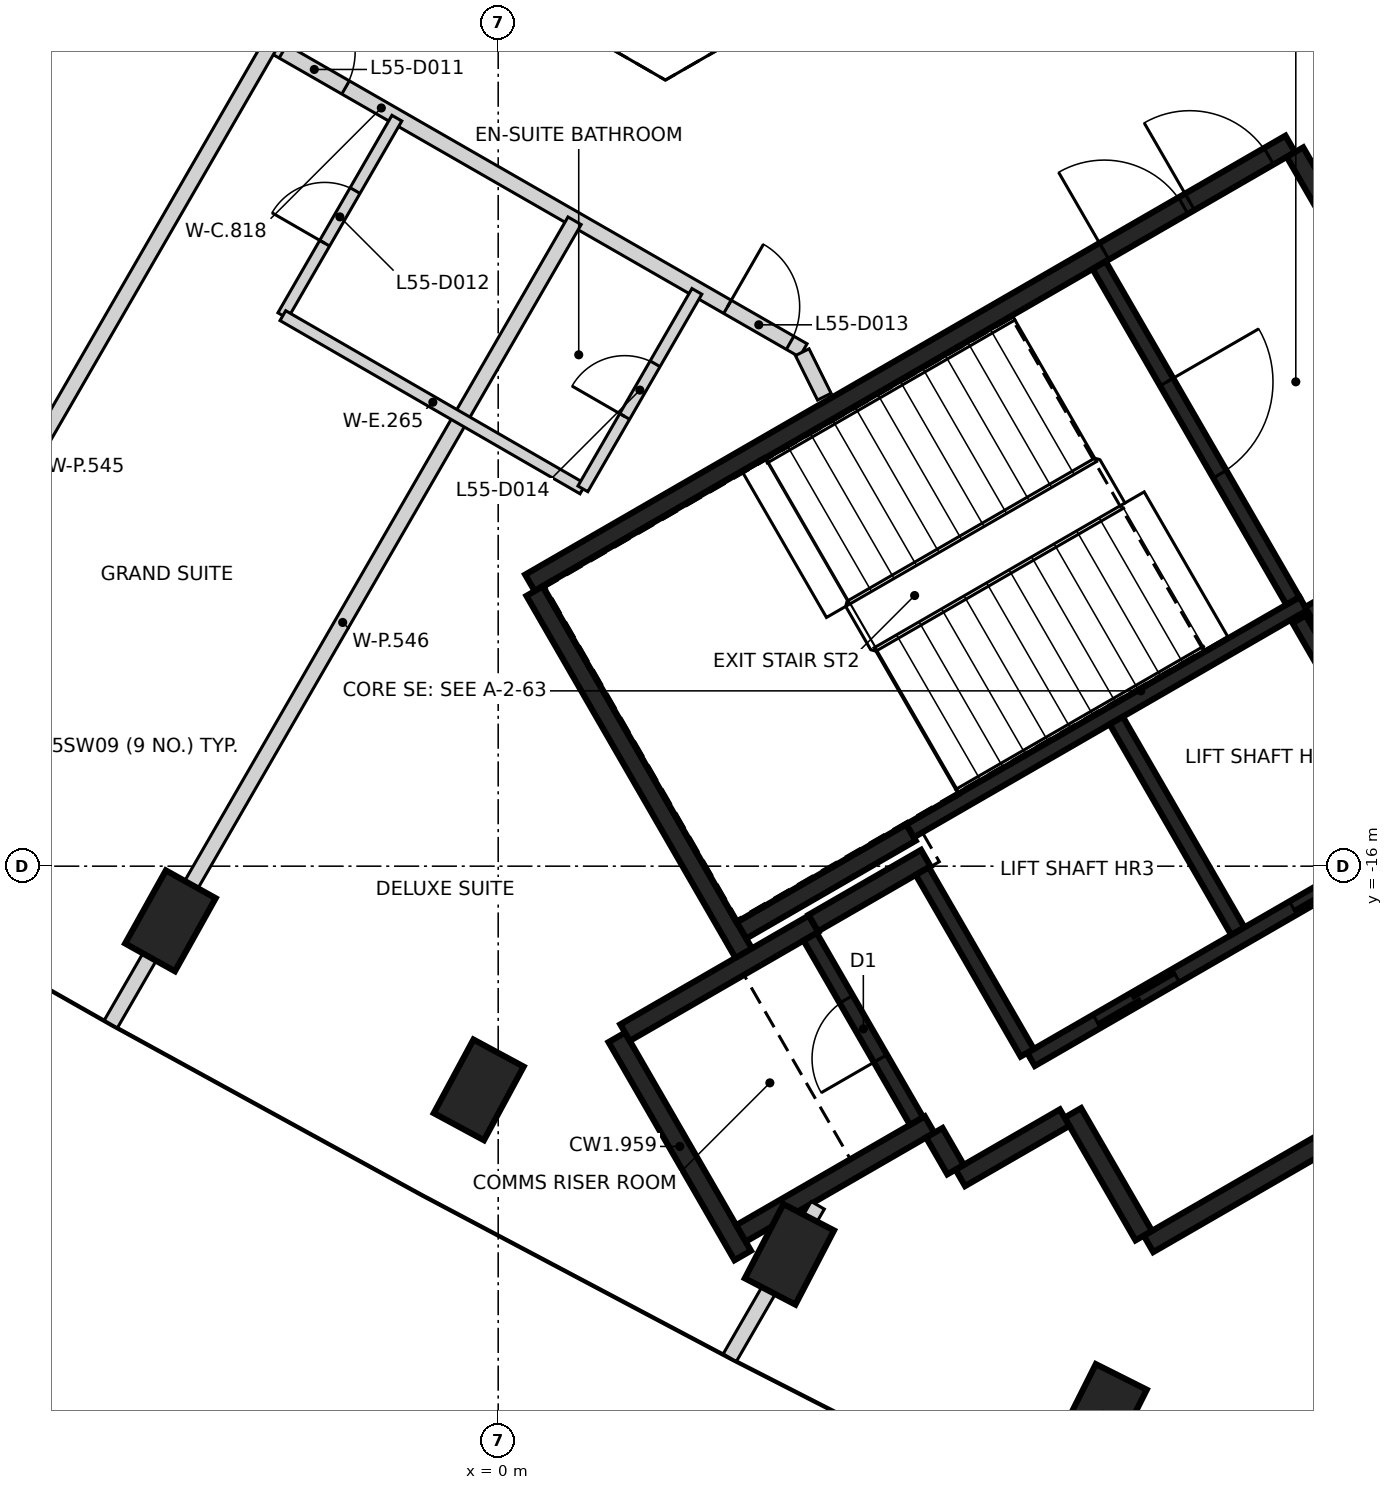
"""IFC4 building model, lengths in metres.
Left out: names, types, materials, properties, quantities, classifications, styles, units other than length and angle.
Written with IfcOpenShell. Run it as: python <this file> out.ifc"""

import sys

from ifc_helpers import new_model, si_unit, direction, frame, frame_2d, origin, origin_2d, place, context, subcontext, project, spatial, rectangle, extrude, element, fill, save


model = new_model("IFC4")
c1 = context("Model", 3, precision=1e-05, world=origin(), true_north=direction((0.0, 1.0)))
c2 = subcontext(c1, "Body", "Model", "MODEL_VIEW")
j1 = project(units=[si_unit("LENGTHUNIT", "METRE"), si_unit("PLANEANGLEUNIT", "RADIAN")], contexts=[c1])
p1 = place(None, origin())
s1 = spatial("IfcSite", under=j1, at=p1, CompositionType="ELEMENT")
p2 = place(p1, origin())
s2 = spatial("IfcBuilding", under=s1, at=p2, CompositionType="ELEMENT")
p3 = place(p2, frame((0.0, 0.0, 221.4)))
s3 = spatial("IfcBuildingStorey", under=s2, at=p3, CompositionType="ELEMENT", Elevation=221.4)
for number, where, z_axis, x_axis in (
    (1, (-4.312, -16.719, -0.35), (0.0, 0.0, 1.0), (0.487, 0.873, 0.0)),
    (2, (-0.256, -18.943, -0.35), (0.0, 0.0, 1.0), (0.475, 0.88, 0.0)),
    (3, (3.832, -21.107, -0.35), (0.0, 0.0, 1.0), (0.461, 0.887, 0.0)),
    (4, (7.951, -23.211, -0.35), (0.0, 0.0, 1.0), (0.449, 0.894, 0.0)),
):
    element("IfcColumn", number, at=place(p3, frame(where, z_axis=z_axis, x_axis=x_axis)), inside=s3, PredefinedType="COLUMN", context=c2, shape_type="SweptSolid", body=[
        extrude(rectangle(XDim=1.1, YDim=0.75, at=origin_2d()), origin(), (0.0, 0.0, 1.0), 3.6),
    ])
p4 = place(p3, frame((0.417, -12.273, 0.0), z_axis=(0.0, 0.0, 1.0), x_axis=(0.866021906294, 0.500006057782, 0.0)))
e5 = element("IfcWall", 5, at=p4, inside=s3, PredefinedType="SHEAR", context=c2, shape_type="SweptSolid", body=[
    extrude(rectangle(XDim=11.55, YDim=0.25, at=frame_2d((5.775, 0.0))), origin(), (0.0, 0.0, 1.0), 3.25),
])
p5 = place(p4, frame((10.025, 0.0, 0.0)))
e6 = element("IfcOpeningElement", 6, at=p5, cuts=e5, PredefinedType="OPENING", context=c2, shape_type="SweptSolid", body=[
    extrude(rectangle(XDim=1.2, YDim=2.1, at=frame_2d((0.6, 1.05))), frame((0.0, 0.135, 0.0), z_axis=(0.0, -1.0, 0.0), x_axis=(1.0, 0.0, 0.0)), (0.0, 0.0, 1.0), 0.27),
])
p6 = place(p4, frame((8.725, 0.0, 0.0)))
e7 = element("IfcOpeningElement", 7, at=p6, cuts=e5, PredefinedType="OPENING", context=c2, shape_type="SweptSolid", body=[
    extrude(rectangle(XDim=1.2, YDim=2.1, at=frame_2d((0.6, 1.05))), frame((0.0, 0.135, 0.0), z_axis=(0.0, -1.0, 0.0), x_axis=(1.0, 0.0, 0.0)), (0.0, 0.0, 1.0), 0.27),
])
p7 = place(p3, frame((16.133, -16.594, 0.0), z_axis=(0.0, 0.0, 1.0), x_axis=(-0.866022959057, -0.500004234368, 0.0)))
e8 = element("IfcWall", 8, at=p7, inside=s3, PredefinedType="SHEAR", context=c2, shape_type="SweptSolid", body=[
    extrude(rectangle(XDim=8.75, YDim=0.25, at=frame_2d((4.375, 0.0))), origin(), (0.0, 0.0, 1.0), 3.25),
])
p8 = place(p3, frame((3.235, -17.153, 0.0), z_axis=(0.0, 0.0, 1.0), x_axis=(-0.500008851346, 0.866020293397, 0.0)))
e9 = element("IfcWall", 9, at=p8, inside=s3, PredefinedType="SHEAR", context=c2, shape_type="SweptSolid", body=[
    extrude(rectangle(XDim=5.51, YDim=0.25, at=frame_2d((2.755, 0.0))), origin(), (0.0, 0.0, 1.0), 3.25),
])
p9 = place(p3, frame((10.483, -6.606, 0.0), z_axis=(0.0, 0.0, 1.0), x_axis=(0.49999885962, -0.866026062182, 0.0)))
e10 = element("IfcWall", 10, at=p9, inside=s3, PredefinedType="SHEAR", context=c2, shape_type="SweptSolid", body=[
    extrude(rectangle(XDim=5.225, YDim=0.25, at=frame_2d((2.612, 0.0))), origin(), (0.0, 0.0, 1.0), 3.25),
])
p10 = place(p3, frame((3.217, -21.122, 0.0), z_axis=(0.0, 0.0, 1.0), x_axis=(-0.499998874531, 0.866026053573, 0.0)))
e11 = element("IfcWall", 11, at=p10, inside=s3, PredefinedType="SHEAR", context=c2, shape_type="SweptSolid", body=[
    extrude(rectangle(XDim=3.313, YDim=0.25, at=frame_2d((1.656, 0.0))), origin(), (0.0, 0.0, 1.0), 3.25),
])
p11 = place(p3, frame((1.669, -18.19, 0.0), z_axis=(0.0, 0.0, 1.0), x_axis=(0.866042235819, 0.499970844928, 0.0)))
e12 = element("IfcWall", 12, at=p11, inside=s3, PredefinedType="SHEAR", context=c2, shape_type="SweptSolid", body=[
    extrude(rectangle(XDim=2.865, YDim=0.25, at=frame_2d((1.432, 0.0))), origin(), (0.0, 0.0, 1.0), 3.25),
])
p12 = place(p3, frame((5.675, -19.399, 0.0), z_axis=(0.0, 0.0, 1.0), x_axis=(-0.866026637627, -0.499997862916, 0.0)))
e13 = element("IfcWall", 13, at=p12, inside=s3, PredefinedType="SHEAR", context=c2, shape_type="SweptSolid", body=[
    extrude(rectangle(XDim=2.865, YDim=0.25, at=frame_2d((1.432, 0.0))), origin(), (0.0, 0.0, 1.0), 3.25),
])
p13 = place(p3, frame((5.431, -15.556, 0.0), z_axis=(0.0, 0.0, 1.0), x_axis=(-0.866022940537, -0.500004266446, 0.0)))
e14 = element("IfcWall", 14, at=p13, inside=s3, PredefinedType="SHEAR", context=c2, shape_type="SweptSolid", body=[
    extrude(rectangle(XDim=2.575, YDim=0.25, at=frame_2d((1.287, 0.0))), origin(), (0.0, 0.0, 1.0), 3.25),
])
p14 = place(p3, frame((8.493, -20.86, 0.0), z_axis=(0.0, 0.0, 1.0), x_axis=(-0.500039802285, 0.866002422705, 0.0)))
e15 = element("IfcWall", 15, at=p14, inside=s3, PredefinedType="SHEAR", context=c2, shape_type="SweptSolid", body=[
    extrude(rectangle(XDim=1.865, YDim=0.25, at=frame_2d((0.932, 0.0))), origin(), (0.0, 0.0, 1.0), 3.25),
])
p15 = place(p3, frame((4.145, -16.749, 0.0), z_axis=(0.0, 0.0, 1.0), x_axis=(0.866038183914, 0.499977863513, 0.0)))
e16 = element("IfcWall", 16, at=p15, inside=s3, PredefinedType="SHEAR", context=c2, shape_type="SweptSolid", body=[
    extrude(rectangle(XDim=1.71, YDim=0.25, at=frame_2d((0.855, 0.0))), origin(), (0.0, 0.0, 1.0), 3.25),
])
p16 = place(p3, frame((7.452, -19.308, 0.0), z_axis=(0.0, 0.0, 1.0), x_axis=(-0.866044474677, -0.49996696679, 0.0)))
e17 = element("IfcWall", 17, at=p16, inside=s3, PredefinedType="SHEAR", context=c2, shape_type="SweptSolid", body=[
    extrude(rectangle(XDim=1.584, YDim=0.25, at=frame_2d((0.792, 0.0))), origin(), (0.0, 0.0, 1.0), 3.25),
])
p17 = place(p3, frame((6.017, -19.992, 0.0), z_axis=(0.0, 0.0, 1.0), x_axis=(-0.500364886717, 0.865814633822, 0.0)))
e18 = element("IfcWall", 18, at=p17, inside=s3, PredefinedType="SHEAR", context=c2, shape_type="SweptSolid", body=[
    extrude(rectangle(XDim=0.559, YDim=0.25, at=frame_2d((0.28, 0.0))), origin(), (0.0, 0.0, 1.0), 3.25),
])
p18 = place(p3, frame((5.419, -15.534, 0.0), z_axis=(0.0, 0.0, 1.0), x_axis=(0.866029065029, 0.499993658486, 0.0)))
e19 = element("IfcWall", 19, at=p18, inside=s3, PredefinedType="SHEAR", context=c2, shape_type="SweptSolid", body=[
    extrude(rectangle(XDim=5.974, YDim=0.2, at=frame_2d((2.987, 0.0))), origin(), (0.0, 0.0, 1.0), 3.25),
])
p19 = place(p3, frame((7.01, -18.542, 0.0), z_axis=(0.0, 0.0, 1.0), x_axis=(0.866030299012, 0.499991521122, 0.0)))
e20 = element("IfcWall", 20, at=p19, inside=s3, PredefinedType="SHEAR", context=c2, shape_type="SweptSolid", body=[
    extrude(rectangle(XDim=6.1, YDim=0.2, at=frame_2d((3.05, 0.0))), origin(), (0.0, 0.0, 1.0), 3.25),
])
p20 = place(p19, frame((1.0, 0.0, 0.0)))
e21 = element("IfcOpeningElement", 21, at=p20, cuts=e20, PredefinedType="OPENING", context=c2, shape_type="SweptSolid", body=[
    extrude(rectangle(XDim=1.2, YDim=2.1, at=frame_2d((0.6, 1.05))), frame((0.0, 0.11, 0.0), z_axis=(0.0, -1.0, 0.0), x_axis=(1.0, 0.0, 0.0)), (0.0, 0.0, 1.0), 0.22),
])
p21 = place(p19, frame((3.982, 0.0, 0.0)))
e22 = element("IfcOpeningElement", 22, at=p21, cuts=e20, PredefinedType="OPENING", context=c2, shape_type="SweptSolid", body=[
    extrude(rectangle(XDim=1.2, YDim=2.1, at=frame_2d((0.6, 1.05))), frame((0.0, 0.11, 0.0), z_axis=(0.0, -1.0, 0.0), x_axis=(1.0, 0.0, 0.0)), (0.0, 0.0, 1.0), 0.22),
])
p22 = place(p3, frame((7.906, -8.094, 0.0), z_axis=(0.0, 0.0, 1.0), x_axis=(0.500027839223, -0.866009330205, 0.0)))
e23 = element("IfcWall", 23, at=p22, inside=s3, PredefinedType="SHEAR", context=c2, shape_type="SweptSolid", body=[
    extrude(rectangle(XDim=5.098, YDim=0.2, at=frame_2d((2.549, 0.0))), origin(), (0.0, 0.0, 1.0), 3.25),
])
p23 = place(p22, frame((1.774, 0.0, 0.0)))
e24 = element("IfcOpeningElement", 24, at=p23, cuts=e23, PredefinedType="OPENING", context=c2, shape_type="SweptSolid", body=[
    extrude(rectangle(XDim=1.4, YDim=2.1, at=frame_2d((0.7, 1.05))), frame((0.0, 0.11, 0.0), z_axis=(0.0, -1.0, 0.0), x_axis=(1.0, 0.0, 0.0)), (0.0, 0.0, 1.0), 0.22),
])
p24 = place(p3, frame((8.132, -14.084, 0.0), z_axis=(0.0, 0.0, 1.0), x_axis=(0.499997778408, -0.866026686418, 0.0)))
e25 = element("IfcWall", 25, at=p24, inside=s3, PredefinedType="SHEAR", context=c2, shape_type="SweptSolid", body=[
    extrude(rectangle(XDim=3.198, YDim=0.2, at=frame_2d((1.599, 0.0))), origin(), (0.0, 0.0, 1.0), 3.25),
])
p25 = place(p3, frame((5.503, -19.352, 0.0), z_axis=(0.0, 0.0, 1.0), x_axis=(-0.499986818241, 0.866033014143, 0.0)))
e26 = element("IfcWall", 26, at=p25, inside=s3, PredefinedType="SHEAR", context=c2, shape_type="SweptSolid", body=[
    extrude(rectangle(XDim=2.798, YDim=0.2, at=frame_2d((1.399, 0.0))), origin(), (0.0, 0.0, 1.0), 3.25),
])
p26 = place(p25, frame((0.949, 0.0, 0.0)))
e27 = element("IfcOpeningElement", 27, at=p26, cuts=e26, PredefinedType="OPENING", context=c2, shape_type="SweptSolid", body=[
    extrude(rectangle(XDim=0.9, YDim=2.1, at=frame_2d((0.45, 1.05))), frame((0.0, 0.11, 0.0), z_axis=(0.0, -1.0, 0.0), x_axis=(1.0, 0.0, 0.0)), (0.0, 0.0, 1.0), 0.22),
])
p27 = place(p3, frame((6.96, -18.455, 0.0), z_axis=(0.0, 0.0, 1.0), x_axis=(-0.499926705758, 0.866067716099, 0.0)))
e28 = element("IfcWall", 28, at=p27, inside=s3, PredefinedType="SHEAR", context=c2, shape_type="SweptSolid", body=[
    extrude(rectangle(XDim=2.759, YDim=0.2, at=frame_2d((1.38, 0.0))), origin(), (0.0, 0.0, 1.0), 3.25),
])
p28 = place(p3, frame((12.088, -15.437, 0.0), z_axis=(0.0, 0.0, 1.0), x_axis=(-0.500026960575, 0.86600983753, 0.0)))
e29 = element("IfcWall", 29, at=p28, inside=s3, PredefinedType="SHEAR", context=c2, shape_type="SweptSolid", body=[
    extrude(rectangle(XDim=3.1, YDim=0.2, at=frame_2d((1.55, 0.0))), origin(), (0.0, 0.0, 1.0), 3.25),
])
p29 = place(p3, frame((10.666, -12.678, 0.0), z_axis=(0.0, 0.0, 1.0), x_axis=(0.866018407898, 0.500012117035, 0.0)))
e30 = element("IfcWall", 30, at=p29, inside=s3, PredefinedType="SHEAR", context=c2, shape_type="SweptSolid", body=[
    extrude(rectangle(XDim=2.651, YDim=0.2, at=frame_2d((1.325, 0.0))), origin(), (0.0, 0.0, 1.0), 3.25),
])
p30 = place(p29, frame((0.652, 0.0, 0.0)))
e31 = element("IfcOpeningElement", 31, at=p30, cuts=e30, PredefinedType="OPENING", context=c2, shape_type="SweptSolid", body=[
    extrude(rectangle(XDim=1.3, YDim=2.1, at=frame_2d((0.65, 1.05))), frame((0.0, 0.11, 0.0), z_axis=(0.0, -1.0, 0.0), x_axis=(1.0, 0.0, 0.0)), (0.0, 0.0, 1.0), 0.22),
])
p31 = place(p3, frame((-7.089, -2.836, 0.0), z_axis=(0.0, 0.0, 1.0), x_axis=(0.867106243364, -0.498123240493, 0.0)))
e32 = element("IfcWall", 32, at=p31, inside=s3, PredefinedType="PARTITIONING", context=c2, shape_type="SweptSolid", body=[
    extrude(rectangle(XDim=12.804, YDim=0.2, at=frame_2d((6.402, 0.0))), origin(), (0.0, 0.0, 1.0), 3.25),
])
p32 = place(p31, frame((1.909, 0.0, 0.0)))
e33 = element("IfcOpeningElement", 33, at=p32, cuts=e32, PredefinedType="OPENING", context=c2, shape_type="SweptSolid", body=[
    extrude(rectangle(XDim=1.0, YDim=2.1, at=frame_2d((0.5, 1.05))), frame((0.0, 0.11, 0.0), z_axis=(0.0, -1.0, 0.0), x_axis=(1.0, 0.0, 0.0)), (0.0, 0.0, 1.0), 0.22),
])
p33 = place(p31, frame((4.91, 0.0, 0.0)))
e34 = element("IfcOpeningElement", 34, at=p33, cuts=e32, PredefinedType="OPENING", context=c2, shape_type="SweptSolid", body=[
    extrude(rectangle(XDim=0.95, YDim=2.1, at=frame_2d((0.475, 1.05))), frame((0.0, 0.11, 0.0), z_axis=(0.0, -1.0, 0.0), x_axis=(1.0, 0.0, 0.0)), (0.0, 0.0, 1.0), 0.22),
])
p34 = place(p31, frame((11.654, 0.0, 0.0)))
e35 = element("IfcOpeningElement", 35, at=p34, cuts=e32, PredefinedType="OPENING", context=c2, shape_type="SweptSolid", body=[
    extrude(rectangle(XDim=0.95, YDim=2.1, at=frame_2d((0.475, 1.05))), frame((0.0, 0.11, 0.0), z_axis=(0.0, -1.0, 0.0), x_axis=(1.0, 0.0, 0.0)), (0.0, 0.0, 1.0), 0.22),
])
p35 = place(p3, frame((4.0, -9.238, 0.0), z_axis=(0.0, 0.0, 1.0), x_axis=(0.444370954227, -0.89584287408, 0.0)))
e36 = element("IfcWall", 36, at=p35, inside=s3, PredefinedType="PARTITIONING", context=c2, shape_type="SweptSolid", body=[
    extrude(rectangle(XDim=0.653, YDim=0.2, at=frame_2d((0.327, 0.0))), origin(), (0.0, 0.0, 1.0), 3.25),
])
p36 = place(p3, frame((-9.119, -15.795, 0.0), z_axis=(0.0, 0.0, 1.0), x_axis=(0.50001601051, 0.866016159915, 0.0)))
e37 = element("IfcWall", 37, at=p36, inside=s3, PredefinedType="PARTITIONING", context=c2, shape_type="SweptSolid", body=[
    extrude(rectangle(XDim=12.238, YDim=0.2, at=frame_2d((6.119, 0.0))), origin(), (0.0, 0.0, 1.0), 3.25),
])
p37 = place(p3, frame((-5.097, -18.078, 0.0), z_axis=(0.0, 0.0, 1.0), x_axis=(0.499960272111, 0.866048339477, 0.0)))
e38 = element("IfcWall", 38, at=p37, inside=s3, PredefinedType="PARTITIONING", context=c2, shape_type="SweptSolid", body=[
    extrude(rectangle(XDim=12.204, YDim=0.2, at=frame_2d((6.102, 0.0))), origin(), (0.0, 0.0, 1.0), 3.25),
])
p38 = place(p3, frame((3.047, -22.467, 0.0), z_axis=(0.0, 0.0, 1.0), x_axis=(0.50001757531, 0.866015256437, 0.0)))
e39 = element("IfcWall", 39, at=p38, inside=s3, PredefinedType="PARTITIONING", context=c2, shape_type="SweptSolid", body=[
    extrude(rectangle(XDim=2.315, YDim=0.2, at=frame_2d((1.158, 0.0))), origin(), (0.0, 0.0, 1.0), 3.25),
])
p39 = place(p3, frame((-2.833, -8.757, 0.0), z_axis=(0.0, 0.0, 1.0), x_axis=(0.499990139034, 0.866031096941, 0.0)))
e40 = element("IfcWall", 40, at=p39, inside=s3, PredefinedType="PARTITIONING", context=c2, shape_type="SweptSolid", body=[
    extrude(rectangle(XDim=3.0, YDim=0.15, at=frame_2d((1.5, 0.0))), origin(), (0.0, 0.0, 1.0), 3.25),
])
p40 = place(p39, frame((1.1, 0.0, 0.0)))
e41 = element("IfcOpeningElement", 41, at=p40, cuts=e40, PredefinedType="OPENING", context=c2, shape_type="SweptSolid", body=[
    extrude(rectangle(XDim=0.8, YDim=2.1, at=frame_2d((0.4, 1.05))), frame((0.0, 0.085, 0.0), z_axis=(0.0, -1.0, 0.0), x_axis=(1.0, 0.0, 0.0)), (0.0, 0.0, 1.0), 0.17),
])
p41 = place(p3, frame((-2.833, -8.757, 0.0), z_axis=(0.0, 0.0, 1.0), x_axis=(0.866002713795, -0.500039298155, 0.0)))
e42 = element("IfcWall", 42, at=p41, inside=s3, PredefinedType="PARTITIONING", context=c2, shape_type="SweptSolid", body=[
    extrude(rectangle(XDim=4.558, YDim=0.15, at=frame_2d((2.279, 0.0))), origin(), (0.0, 0.0, 1.0), 3.25),
])
p42 = place(p3, frame((1.114, -11.036, 0.0), z_axis=(0.0, 0.0, 1.0), x_axis=(0.50002537861, 0.866010750942, 0.0)))
e43 = element("IfcWall", 43, at=p42, inside=s3, PredefinedType="PARTITIONING", context=c2, shape_type="SweptSolid", body=[
    extrude(rectangle(XDim=3.0, YDim=0.15, at=frame_2d((1.5, 0.0))), origin(), (0.0, 0.0, 1.0), 3.25),
])
p43 = place(p42, frame((1.1, 0.0, 0.0)))
e44 = element("IfcOpeningElement", 44, at=p43, cuts=e43, PredefinedType="OPENING", context=c2, shape_type="SweptSolid", body=[
    extrude(rectangle(XDim=0.8, YDim=2.1, at=frame_2d((0.4, 1.05))), frame((0.0, 0.085, 0.0), z_axis=(0.0, -1.0, 0.0), x_axis=(1.0, 0.0, 0.0)), (0.0, 0.0, 1.0), 0.17),
])
p44 = place(p20, origin())
e45 = element("IfcDoor", 45, at=p44, inside=s3, OperationType="DOUBLE_DOOR_SLIDING", PredefinedType="DOOR", context=c2, shape_type="SweptSolid", body=[
    extrude(rectangle(XDim=1.2, YDim=2.1, at=frame_2d((0.6, 1.05))), frame((0.0, 0.025, 0.0), z_axis=(0.0, -1.0, 0.0), x_axis=(1.0, 0.0, 0.0)), (0.0, 0.0, 1.0), 0.05),
])
fill(e21, e45)
p45 = place(p21, origin())
e46 = element("IfcDoor", 46, at=p45, inside=s3, OperationType="DOUBLE_DOOR_SLIDING", PredefinedType="DOOR", context=c2, shape_type="SweptSolid", body=[
    extrude(rectangle(XDim=1.2, YDim=2.1, at=frame_2d((0.6, 1.05))), frame((0.0, 0.025, 0.0), z_axis=(0.0, -1.0, 0.0), x_axis=(1.0, 0.0, 0.0)), (0.0, 0.0, 1.0), 0.05),
])
fill(e22, e46)
p46 = place(p5, origin())
e47 = element("IfcDoor", 47, at=p46, inside=s3, OperationType="SINGLE_SWING_LEFT", PredefinedType="DOOR", context=c2, shape_type="SweptSolid", body=[
    extrude(rectangle(XDim=1.2, YDim=2.1, at=frame_2d((0.6, 1.05))), frame((0.0, 0.025, 0.0), z_axis=(0.0, -1.0, 0.0), x_axis=(1.0, 0.0, 0.0)), (0.0, 0.0, 1.0), 0.05),
])
fill(e6, e47)
p47 = place(p6, origin())
e48 = element("IfcDoor", 48, at=p47, inside=s3, OperationType="SINGLE_SWING_RIGHT", PredefinedType="DOOR", context=c2, shape_type="SweptSolid", body=[
    extrude(rectangle(XDim=1.2, YDim=2.1, at=frame_2d((0.6, 1.05))), frame((0.0, 0.025, 0.0), z_axis=(0.0, -1.0, 0.0), x_axis=(1.0, 0.0, 0.0)), (0.0, 0.0, 1.0), 0.05),
])
fill(e7, e48)
p48 = place(p23, origin())
e49 = element("IfcDoor", 49, at=p48, inside=s3, OperationType="SINGLE_SWING_RIGHT", PredefinedType="DOOR", context=c2, shape_type="SweptSolid", body=[
    extrude(rectangle(XDim=1.4, YDim=2.1, at=frame_2d((0.7, 1.05))), frame((0.0, 0.025, 0.0), z_axis=(0.0, -1.0, 0.0), x_axis=(1.0, 0.0, 0.0)), (0.0, 0.0, 1.0), 0.05),
])
fill(e24, e49)
p49 = place(p26, origin())
e50 = element("IfcDoor", 50, at=p49, inside=s3, OperationType="SINGLE_SWING_LEFT", PredefinedType="DOOR", context=c2, shape_type="SweptSolid", body=[
    extrude(rectangle(XDim=0.9, YDim=2.1, at=frame_2d((0.45, 1.05))), frame((0.0, 0.025, 0.0), z_axis=(0.0, -1.0, 0.0), x_axis=(1.0, 0.0, 0.0)), (0.0, 0.0, 1.0), 0.05),
])
fill(e27, e50)
p50 = place(p33, frame((0.95, 0.0, 0.0), z_axis=(0.0, 0.0, 1.0), x_axis=(-1.0, 0.0, 0.0)))
e51 = element("IfcDoor", 51, at=p50, inside=s3, OperationType="SINGLE_SWING_LEFT", PredefinedType="DOOR", context=c2, shape_type="SweptSolid", body=[
    extrude(rectangle(XDim=0.95, YDim=2.1, at=frame_2d((0.475, 1.05))), frame((0.0, 0.025, 0.0), z_axis=(0.0, -1.0, 0.0), x_axis=(1.0, 0.0, 0.0)), (0.0, 0.0, 1.0), 0.05),
])
fill(e34, e51)
p51 = place(p40, frame((0.8, 0.0, 0.0), z_axis=(0.0, 0.0, 1.0), x_axis=(-1.0, 0.0, 0.0)))
e52 = element("IfcDoor", 52, at=p51, inside=s3, OperationType="SINGLE_SWING_LEFT", PredefinedType="DOOR", context=c2, shape_type="SweptSolid", body=[
    extrude(rectangle(XDim=0.8, YDim=2.1, at=frame_2d((0.4, 1.05))), frame((0.0, 0.025, 0.0), z_axis=(0.0, -1.0, 0.0), x_axis=(1.0, 0.0, 0.0)), (0.0, 0.0, 1.0), 0.05),
])
fill(e41, e52)
p52 = place(p34, frame((0.95, 0.0, 0.0), z_axis=(0.0, 0.0, 1.0), x_axis=(-1.0, 0.0, 0.0)))
e53 = element("IfcDoor", 53, at=p52, inside=s3, OperationType="SINGLE_SWING_LEFT", PredefinedType="DOOR", context=c2, shape_type="SweptSolid", body=[
    extrude(rectangle(XDim=0.95, YDim=2.1, at=frame_2d((0.475, 1.05))), frame((0.0, 0.025, 0.0), z_axis=(0.0, -1.0, 0.0), x_axis=(1.0, 0.0, 0.0)), (0.0, 0.0, 1.0), 0.05),
])
fill(e35, e53)
p53 = place(p43, origin())
e54 = element("IfcDoor", 54, at=p53, inside=s3, OperationType="SINGLE_SWING_LEFT", PredefinedType="DOOR", context=c2, shape_type="SweptSolid", body=[
    extrude(rectangle(XDim=0.8, YDim=2.1, at=frame_2d((0.4, 1.05))), frame((0.0, 0.025, 0.0), z_axis=(0.0, -1.0, 0.0), x_axis=(1.0, 0.0, 0.0)), (0.0, 0.0, 1.0), 0.05),
])
fill(e44, e54)
save(model, sys.argv[1])
